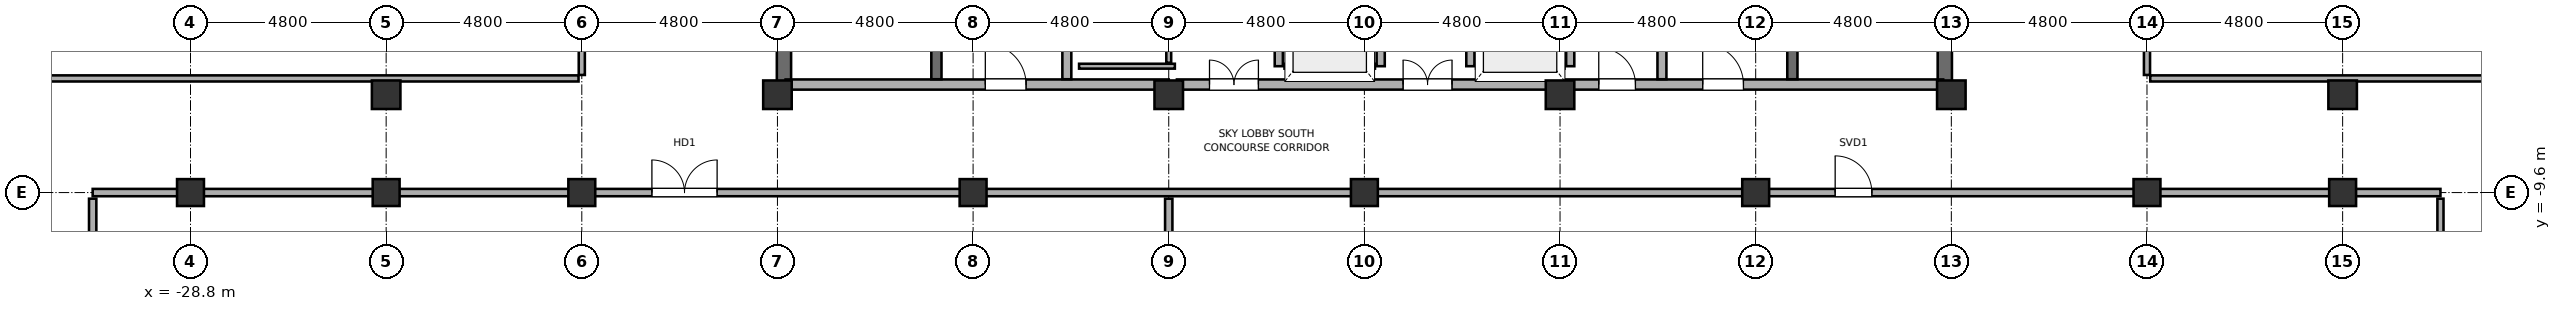
"""IFC4 building model, lengths in metres.
Left out: names, types, materials, properties, quantities, classifications, styles, units other than length and angle.
Written with IfcOpenShell. Run it as: python <this file> out.ifc"""

import sys

from ifc_helpers import new_model, si_unit, direction, frame, frame_2d, origin, origin_2d, place, context, subcontext, project, spatial, rectangle, hollow_rectangle, hollow_circle, extrude, element, fill, save


model = new_model("IFC4")
c1 = context("Model", 3, precision=1e-05, world=origin(), true_north=direction((0.0, 1.0)))
c2 = subcontext(c1, "Body", "Model", "MODEL_VIEW")
j1 = project(units=[si_unit("LENGTHUNIT", "METRE"), si_unit("PLANEANGLEUNIT", "RADIAN")], contexts=[c1])
p1 = place(None, origin())
s1 = spatial("IfcSite", under=j1, at=p1, CompositionType="ELEMENT")
p2 = place(p1, origin())
s2 = spatial("IfcBuilding", under=s1, at=p2, CompositionType="ELEMENT")
p3 = place(p2, frame((0.0, 0.0, 180.3)))
s3 = spatial("IfcBuildingStorey", under=s2, at=p3, CompositionType="ELEMENT", Elevation=180.3)
for number, where, z_axis, x_axis in (
    (1, (-28.8, -9.6, 0.0), (0.0, 0.0, 1.0), (1.0, 0.0, 0.0)),
    (2, (-24.0, -9.6, 0.0), (0.0, 0.0, 1.0), (1.0, 0.0, 0.0)),
):
    element("IfcColumn", number, at=place(p3, frame(where, z_axis=z_axis, x_axis=x_axis)), inside=s3, PredefinedType="COLUMN", context=c2, shape_type="SweptSolid", body=[
        extrude(hollow_circle(Radius=0.33, WallThickness=0.028, at=origin_2d()), origin(), (0.0, 0.0, 1.0), 5.2),
    ])
p4 = place(p3, frame((-24.0, -7.2, 0.0), z_axis=(0.0, 0.0, 1.0), x_axis=(1.0, 0.0, 0.0)))
e3 = element("IfcColumn", 3, at=p4, inside=s3, PredefinedType="COLUMN", context=c2, shape_type="SweptSolid", body=[
    extrude(hollow_rectangle(XDim=0.7, YDim=0.7, WallThickness=0.032, at=origin_2d()), origin(), (0.0, 0.0, 1.0), 5.2),
])
p5 = place(p3, frame((-19.2, -9.6, 0.0), z_axis=(0.0, 0.0, 1.0), x_axis=(1.0, 0.0, 0.0)))
e4 = element("IfcColumn", 4, at=p5, inside=s3, PredefinedType="COLUMN", context=c2, shape_type="SweptSolid", body=[
    extrude(hollow_circle(Radius=0.33, WallThickness=0.028, at=origin_2d()), origin(), (0.0, 0.0, 1.0), 5.2),
])
p6 = place(p3, frame((-14.4, -7.2, 0.0), z_axis=(0.0, 0.0, 1.0), x_axis=(1.0, 0.0, 0.0)))
e5 = element("IfcColumn", 5, at=p6, inside=s3, PredefinedType="COLUMN", context=c2, shape_type="SweptSolid", body=[
    extrude(hollow_rectangle(XDim=0.7, YDim=0.7, WallThickness=0.032, at=origin_2d()), origin(), (0.0, 0.0, 1.0), 5.2),
])
p7 = place(p3, frame((-9.6, -9.6, 0.0), z_axis=(0.0, 0.0, 1.0), x_axis=(1.0, 0.0, 0.0)))
e6 = element("IfcColumn", 6, at=p7, inside=s3, PredefinedType="COLUMN", context=c2, shape_type="SweptSolid", body=[
    extrude(hollow_circle(Radius=0.33, WallThickness=0.028, at=origin_2d()), origin(), (0.0, 0.0, 1.0), 5.2),
])
p8 = place(p3, frame((-4.8, -7.2, 0.0), z_axis=(0.0, 0.0, 1.0), x_axis=(1.0, 0.0, 0.0)))
e7 = element("IfcColumn", 7, at=p8, inside=s3, PredefinedType="COLUMN", context=c2, shape_type="SweptSolid", body=[
    extrude(hollow_rectangle(XDim=0.7, YDim=0.7, WallThickness=0.032, at=origin_2d()), origin(), (0.0, 0.0, 1.0), 5.2),
])
p9 = place(p3, frame((0.0, -9.6, 0.0), z_axis=(0.0, 0.0, 1.0), x_axis=(1.0, 0.0, 0.0)))
e8 = element("IfcColumn", 8, at=p9, inside=s3, PredefinedType="COLUMN", context=c2, shape_type="SweptSolid", body=[
    extrude(hollow_circle(Radius=0.33, WallThickness=0.028, at=origin_2d()), origin(), (0.0, 0.0, 1.0), 5.2),
])
p10 = place(p3, frame((4.8, -7.2, 0.0), z_axis=(0.0, 0.0, 1.0), x_axis=(1.0, 0.0, 0.0)))
e9 = element("IfcColumn", 9, at=p10, inside=s3, PredefinedType="COLUMN", context=c2, shape_type="SweptSolid", body=[
    extrude(hollow_rectangle(XDim=0.7, YDim=0.7, WallThickness=0.032, at=origin_2d()), origin(), (0.0, 0.0, 1.0), 5.2),
])
p11 = place(p3, frame((9.6, -9.6, 0.0), z_axis=(0.0, 0.0, 1.0), x_axis=(1.0, 0.0, 0.0)))
e10 = element("IfcColumn", 10, at=p11, inside=s3, PredefinedType="COLUMN", context=c2, shape_type="SweptSolid", body=[
    extrude(hollow_circle(Radius=0.33, WallThickness=0.028, at=origin_2d()), origin(), (0.0, 0.0, 1.0), 5.2),
])
p12 = place(p3, frame((14.4, -7.2, 0.0), z_axis=(0.0, 0.0, 1.0), x_axis=(1.0, 0.0, 0.0)))
e11 = element("IfcColumn", 11, at=p12, inside=s3, PredefinedType="COLUMN", context=c2, shape_type="SweptSolid", body=[
    extrude(hollow_rectangle(XDim=0.7, YDim=0.7, WallThickness=0.032, at=origin_2d()), origin(), (0.0, 0.0, 1.0), 5.2),
])
for number, where, z_axis, x_axis in (
    (12, (19.2, -9.6, 0.0), (0.0, 0.0, 1.0), (1.0, 0.0, 0.0)),
    (13, (24.0, -9.6, 0.0), (0.0, 0.0, 1.0), (1.0, 0.0, 0.0)),
):
    element("IfcColumn", number, at=place(p3, frame(where, z_axis=z_axis, x_axis=x_axis)), inside=s3, PredefinedType="COLUMN", context=c2, shape_type="SweptSolid", body=[
        extrude(hollow_circle(Radius=0.33, WallThickness=0.028, at=origin_2d()), origin(), (0.0, 0.0, 1.0), 5.2),
    ])
p13 = place(p3, frame((24.0, -7.2, 0.0), z_axis=(0.0, 0.0, 1.0), x_axis=(1.0, 0.0, 0.0)))
e14 = element("IfcColumn", 14, at=p13, inside=s3, PredefinedType="COLUMN", context=c2, shape_type="SweptSolid", body=[
    extrude(hollow_rectangle(XDim=0.7, YDim=0.7, WallThickness=0.032, at=origin_2d()), origin(), (0.0, 0.0, 1.0), 5.2),
])
for number, where, z_axis, x_axis in (
    (15, (-14.24, -7.2, -0.22), (0.0, 0.0, 1.0), (0.0, 1.0, 0.0)),
    (16, (14.24, -7.2, -0.22), (0.0, 0.0, 1.0), (0.0, 1.0, 0.0)),
):
    element("IfcWall", number, at=place(p3, frame(where, z_axis=z_axis, x_axis=x_axis)), inside=s3, PredefinedType="SHEAR", context=c2, shape_type="SweptSolid", body=[
        extrude(rectangle(XDim=14.4, YDim=0.35, at=frame_2d((7.2, 0.0))), origin(), (0.0, 0.0, 1.0), 5.17),
    ])
p14 = place(p3, frame((-14.2, -6.95, 0.0), z_axis=(0.0, 0.0, 1.0), x_axis=(1.0, 0.0, 0.0)))
e17 = element("IfcWall", 17, at=p14, inside=s3, PredefinedType="SOLIDWALL", context=c2, shape_type="SweptSolid", body=[
    extrude(rectangle(XDim=9.4, YDim=0.25, at=frame_2d((4.7, 0.0))), origin(), (0.0, 0.0, 1.0), 3.55),
])
p15 = place(p14, frame((4.9, 0.0, 0.0)))
e18 = element("IfcOpeningElement", 18, at=p15, cuts=e17, PredefinedType="OPENING", context=c2, shape_type="SweptSolid", body=[
    extrude(rectangle(XDim=1.0, YDim=2.15, at=frame_2d((0.5, 1.075))), frame((0.0, 0.14, 0.0), z_axis=(0.0, -1.0, 0.0), x_axis=(1.0, 0.0, 0.0)), (0.0, 0.0, 1.0), 0.28),
])
p16 = place(p3, frame((-4.6, -6.95, 0.0), z_axis=(0.0, 0.0, 1.0), x_axis=(1.0, 0.0, 0.0)))
e19 = element("IfcWall", 19, at=p16, inside=s3, PredefinedType="SOLIDWALL", context=c2, shape_type="SweptSolid", body=[
    extrude(rectangle(XDim=9.2, YDim=0.25, at=frame_2d((4.6, 0.0))), origin(), (0.0, 0.0, 1.0), 3.75),
])
p17 = place(p16, frame((0.8, 0.0, 0.0)))
e20 = element("IfcOpeningElement", 20, at=p17, cuts=e19, PredefinedType="OPENING", context=c2, shape_type="SweptSolid", body=[
    extrude(rectangle(XDim=1.2, YDim=2.2, at=frame_2d((0.6, 1.1))), frame((0.0, 0.14, 0.0), z_axis=(0.0, -1.0, 0.0), x_axis=(1.0, 0.0, 0.0)), (0.0, 0.0, 1.0), 0.28),
])
p18 = place(p16, frame((5.55, 0.0, 0.0)))
e21 = element("IfcOpeningElement", 21, at=p18, cuts=e19, PredefinedType="OPENING", context=c2, shape_type="SweptSolid", body=[
    extrude(rectangle(XDim=1.2, YDim=2.2, at=frame_2d((0.6, 1.1))), frame((0.0, 0.14, 0.0), z_axis=(0.0, -1.0, 0.0), x_axis=(1.0, 0.0, 0.0)), (0.0, 0.0, 1.0), 0.28),
])
p19 = place(p3, frame((4.8, -6.95, 0.0), z_axis=(0.0, 0.0, 1.0), x_axis=(1.0, 0.0, 0.0)))
e22 = element("IfcWall", 22, at=p19, inside=s3, PredefinedType="SOLIDWALL", context=c2, shape_type="SweptSolid", body=[
    extrude(rectangle(XDim=9.4, YDim=0.25, at=frame_2d((4.7, 0.0))), origin(), (0.0, 0.0, 1.0), 3.55),
])
p20 = place(p19, frame((3.5, 0.0, 0.0)))
e23 = element("IfcOpeningElement", 23, at=p20, cuts=e22, PredefinedType="OPENING", context=c2, shape_type="SweptSolid", body=[
    extrude(rectangle(XDim=1.0, YDim=2.15, at=frame_2d((0.5, 1.075))), frame((0.0, 0.14, 0.0), z_axis=(0.0, -1.0, 0.0), x_axis=(1.0, 0.0, 0.0)), (0.0, 0.0, 1.0), 0.28),
])
p21 = place(p19, frame((0.95, 0.0, 0.0)))
e24 = element("IfcOpeningElement", 24, at=p21, cuts=e22, PredefinedType="OPENING", context=c2, shape_type="SweptSolid", body=[
    extrude(rectangle(XDim=0.9, YDim=2.1, at=frame_2d((0.45, 1.05))), frame((0.0, 0.14, 0.0), z_axis=(0.0, -1.0, 0.0), x_axis=(1.0, 0.0, 0.0)), (0.0, 0.0, 1.0), 0.28),
])
for number, where, z_axis, x_axis in (
    (25, (-7.3, -6.82, 0.0), (0.0, 0.0, 1.0), (0.0, 1.0, 0.0)),
    (26, (7.3, -6.82, 0.0), (0.0, 0.0, 1.0), (0.0, 1.0, 0.0)),
):
    element("IfcWall", number, at=place(p3, frame(where, z_axis=z_axis, x_axis=x_axis)), inside=s3, PredefinedType="SOLIDWALL", context=c2, shape_type="SweptSolid", body=[
        extrude(rectangle(XDim=3.67, YDim=0.22, at=frame_2d((1.835, 0.0))), origin(), (0.0, 0.0, 1.0), 3.55),
    ])
p22 = place(p3, frame((-10.5, -6.82, -0.22), z_axis=(0.0, 0.0, 1.0), x_axis=(0.0, 1.0, 0.0)))
e27 = element("IfcWall", 27, at=p22, inside=s3, PredefinedType="SOLIDWALL", context=c2, shape_type="SweptSolid", body=[
    extrude(rectangle(XDim=13.64, YDim=0.25, at=frame_2d((6.82, 0.0))), origin(), (0.0, 0.0, 1.0), 5.17),
])
p23 = place(p22, frame((2.32, 0.0, 0.22)))
e28 = element("IfcOpeningElement", 28, at=p23, cuts=e27, PredefinedType="OPENING", context=c2, shape_type="SweptSolid", body=[
    extrude(rectangle(XDim=0.95, YDim=2.15, at=frame_2d((0.475, 1.075))), frame((0.0, 0.14, 0.0), z_axis=(0.0, -1.0, 0.0), x_axis=(1.0, 0.0, 0.0)), (0.0, 0.0, 1.0), 0.28),
])
p24 = place(p3, frame((10.5, -6.82, -0.22), z_axis=(0.0, 0.0, 1.0), x_axis=(0.0, 1.0, 0.0)))
e29 = element("IfcWall", 29, at=p24, inside=s3, PredefinedType="SOLIDWALL", context=c2, shape_type="SweptSolid", body=[
    extrude(rectangle(XDim=13.64, YDim=0.25, at=frame_2d((6.82, 0.0))), origin(), (0.0, 0.0, 1.0), 5.17),
])
p25 = place(p24, frame((2.32, 0.0, 0.22)))
e30 = element("IfcOpeningElement", 30, at=p25, cuts=e29, PredefinedType="OPENING", context=c2, shape_type="SweptSolid", body=[
    extrude(rectangle(XDim=0.95, YDim=2.15, at=frame_2d((0.475, 1.075))), frame((0.0, 0.14, 0.0), z_axis=(0.0, -1.0, 0.0), x_axis=(1.0, 0.0, 0.0)), (0.0, 0.0, 1.0), 0.28),
])
p26 = place(p3, frame((-2.1, -6.5, 0.0), z_axis=(0.0, 0.0, 1.0), x_axis=(0.0, 1.0, 0.0)))
e31 = element("IfcWall", 31, at=p26, inside=s3, PredefinedType="SOLIDWALL", context=c2, shape_type="SweptSolid", body=[
    extrude(rectangle(XDim=8.85, YDim=0.2, at=frame_2d((4.425, 0.0))), origin(), (0.0, 0.0, 1.0), 4.95),
])
p27 = place(p26, frame((0.5, 0.0, 0.0)))
e32 = element("IfcOpeningElement", 32, at=p27, cuts=e31, PredefinedType="OPENING", context=c2, shape_type="SweptSolid", body=[
    extrude(rectangle(XDim=1.1, YDim=2.2, at=frame_2d((0.55, 1.1))), frame((0.0, 0.115, 0.0), z_axis=(0.0, -1.0, 0.0), x_axis=(1.0, 0.0, 0.0)), (0.0, 0.0, 1.0), 0.23),
])
p28 = place(p26, frame((2.75, 0.0, 0.0)))
e33 = element("IfcOpeningElement", 33, at=p28, cuts=e31, PredefinedType="OPENING", context=c2, shape_type="SweptSolid", body=[
    extrude(rectangle(XDim=1.1, YDim=2.2, at=frame_2d((0.55, 1.1))), frame((0.0, 0.115, 0.0), z_axis=(0.0, -1.0, 0.0), x_axis=(1.0, 0.0, 0.0)), (0.0, 0.0, 1.0), 0.23),
])
p29 = place(p26, frame((5.0, 0.0, 0.0)))
e34 = element("IfcOpeningElement", 34, at=p29, cuts=e31, PredefinedType="OPENING", context=c2, shape_type="SweptSolid", body=[
    extrude(rectangle(XDim=1.1, YDim=2.2, at=frame_2d((0.55, 1.1))), frame((0.0, 0.115, 0.0), z_axis=(0.0, -1.0, 0.0), x_axis=(1.0, 0.0, 0.0)), (0.0, 0.0, 1.0), 0.23),
])
p30 = place(p26, frame((7.25, 0.0, 0.0)))
e35 = element("IfcOpeningElement", 35, at=p30, cuts=e31, PredefinedType="OPENING", context=c2, shape_type="SweptSolid", body=[
    extrude(rectangle(XDim=1.1, YDim=2.2, at=frame_2d((0.55, 1.1))), frame((0.0, 0.115, 0.0), z_axis=(0.0, -1.0, 0.0), x_axis=(1.0, 0.0, 0.0)), (0.0, 0.0, 1.0), 0.23),
])
p31 = place(p3, frame((0.4, -6.5, 0.0), z_axis=(0.0, 0.0, 1.0), x_axis=(0.0, 1.0, 0.0)))
e36 = element("IfcWall", 36, at=p31, inside=s3, PredefinedType="SOLIDWALL", context=c2, shape_type="SweptSolid", body=[
    extrude(rectangle(XDim=8.85, YDim=0.2, at=frame_2d((4.425, 0.0))), origin(), (0.0, 0.0, 1.0), 4.95),
])
p32 = place(p3, frame((-1.96, -6.5, 0.0), z_axis=(0.0, 0.0, 1.0), x_axis=(1.0, 0.0, 0.0)))
e37 = element("IfcWall", 37, at=p32, inside=s3, PredefinedType="PARTITIONING", context=c2, shape_type="SweptSolid", body=[
    extrude(rectangle(XDim=2.22, YDim=0.12, at=frame_2d((1.11, 0.0))), origin(), (0.0, 0.0, 1.0), 4.95),
])
p33 = place(p3, frame((2.6, -6.5, 0.0), z_axis=(0.0, 0.0, 1.0), x_axis=(0.0, 1.0, 0.0)))
e38 = element("IfcWall", 38, at=p33, inside=s3, PredefinedType="SOLIDWALL", context=c2, shape_type="SweptSolid", body=[
    extrude(rectangle(XDim=6.6, YDim=0.2, at=frame_2d((3.3, 0.0))), origin(), (0.0, 0.0, 1.0), 4.95),
])
p34 = place(p33, frame((0.5, 0.0, 0.0)))
e39 = element("IfcOpeningElement", 39, at=p34, cuts=e38, PredefinedType="OPENING", context=c2, shape_type="SweptSolid", body=[
    extrude(rectangle(XDim=1.1, YDim=2.2, at=frame_2d((0.55, 1.1))), frame((0.0, 0.115, 0.0), z_axis=(0.0, -1.0, 0.0), x_axis=(1.0, 0.0, 0.0)), (0.0, 0.0, 1.0), 0.23),
])
p35 = place(p33, frame((2.75, 0.0, 0.0)))
e40 = element("IfcOpeningElement", 40, at=p35, cuts=e38, PredefinedType="OPENING", context=c2, shape_type="SweptSolid", body=[
    extrude(rectangle(XDim=1.1, YDim=2.2, at=frame_2d((0.55, 1.1))), frame((0.0, 0.115, 0.0), z_axis=(0.0, -1.0, 0.0), x_axis=(1.0, 0.0, 0.0)), (0.0, 0.0, 1.0), 0.23),
])
p36 = place(p33, frame((5.0, 0.0, 0.0)))
e41 = element("IfcOpeningElement", 41, at=p36, cuts=e38, PredefinedType="OPENING", context=c2, shape_type="SweptSolid", body=[
    extrude(rectangle(XDim=1.1, YDim=2.2, at=frame_2d((0.55, 1.1))), frame((0.0, 0.115, 0.0), z_axis=(0.0, -1.0, 0.0), x_axis=(1.0, 0.0, 0.0)), (0.0, 0.0, 1.0), 0.23),
])
p37 = place(p3, frame((5.05, -6.5, 0.0), z_axis=(0.0, 0.0, 1.0), x_axis=(0.0, 1.0, 0.0)))
e42 = element("IfcWall", 42, at=p37, inside=s3, PredefinedType="SOLIDWALL", context=c2, shape_type="SweptSolid", body=[
    extrude(rectangle(XDim=6.6, YDim=0.2, at=frame_2d((3.3, 0.0))), origin(), (0.0, 0.0, 1.0), 4.95),
])
p38 = place(p3, frame((2.74, -6.5, 0.0), z_axis=(0.0, 0.0, 1.0), x_axis=(1.0, 0.0, 0.0)))
e43 = element("IfcWall", 43, at=p38, inside=s3, PredefinedType="PARTITIONING", context=c2, shape_type="SweptSolid", body=[
    extrude(rectangle(XDim=2.17, YDim=0.12, at=frame_2d((1.085, 0.0))), origin(), (0.0, 0.0, 1.0), 4.95),
])
p39 = place(p3, frame((-31.2, -9.6, 0.0), z_axis=(0.0, 0.0, 1.0), x_axis=(1.0, 0.0, 0.0)))
e44 = element("IfcWall", 44, at=p39, inside=s3, PredefinedType="PARTITIONING", context=c2, shape_type="SweptSolid", body=[
    extrude(rectangle(XDim=57.6, YDim=0.18, at=frame_2d((28.8, 0.0))), origin(), (0.0, 0.0, 1.0), 3.55),
])
p40 = place(p39, frame((13.72, 0.0, 0.0)))
e45 = element("IfcOpeningElement", 45, at=p40, cuts=e44, PredefinedType="OPENING", context=c2, shape_type="SweptSolid", body=[
    extrude(rectangle(XDim=1.6, YDim=2.3, at=frame_2d((0.8, 1.15))), frame((0.0, 0.105, 0.0), z_axis=(0.0, -1.0, 0.0), x_axis=(1.0, 0.0, 0.0)), (0.0, 0.0, 1.0), 0.21),
])
p41 = place(p39, frame((42.75, 0.0, 0.0)))
e46 = element("IfcOpeningElement", 46, at=p41, cuts=e44, PredefinedType="OPENING", context=c2, shape_type="SweptSolid", body=[
    extrude(rectangle(XDim=0.9, YDim=2.1, at=frame_2d((0.45, 1.05))), frame((0.0, 0.105, 0.0), z_axis=(0.0, -1.0, 0.0), x_axis=(1.0, 0.0, 0.0)), (0.0, 0.0, 1.0), 0.21),
])
p42 = place(p3, frame((-33.31, -6.8, 0.0), z_axis=(0.0, 0.0, 1.0), x_axis=(1.0, 0.0, 0.0)))
e47 = element("IfcWall", 47, at=p42, inside=s3, PredefinedType="PARTITIONING", context=c2, shape_type="SweptSolid", body=[
    extrude(rectangle(XDim=14.03, YDim=0.15, at=frame_2d((7.015, 0.0))), origin(), (0.0, 0.0, 1.0), 3.55),
])
p43 = place(p3, frame((19.28, -6.8, 0.0), z_axis=(0.0, 0.0, 1.0), x_axis=(1.0, 0.0, 0.0)))
e48 = element("IfcWall", 48, at=p43, inside=s3, PredefinedType="PARTITIONING", context=c2, shape_type="SweptSolid", body=[
    extrude(rectangle(XDim=9.23, YDim=0.15, at=frame_2d((4.615, 0.0))), origin(), (0.0, 0.0, 1.0), 3.55),
])
p44 = place(p3, frame((-7.0, -6.5, 0.0), z_axis=(0.0, 0.0, 1.0), x_axis=(1.0, 0.0, 0.0)))
e49 = element("IfcWall", 49, at=p44, inside=s3, PredefinedType="PARTITIONING", context=c2, shape_type="SweptSolid", body=[
    extrude(rectangle(XDim=2.35, YDim=0.12, at=frame_2d((1.175, 0.0))), origin(), (0.0, 0.0, 1.0), 4.95),
])
p45 = place(p3, frame((-31.2, -23.239, 0.0), z_axis=(0.0, 0.0, 1.0), x_axis=(0.0, 1.0, 0.0)))
e50 = element("IfcWall", 50, at=p45, inside=s3, PredefinedType="PARTITIONING", context=c2, shape_type="SweptSolid", body=[
    extrude(rectangle(XDim=13.489, YDim=0.18, at=frame_2d((6.744, 0.0))), origin(), (0.0, 0.0, 1.0), 3.55),
])
p46 = place(p3, frame((-19.2, -6.715, 0.0), z_axis=(0.0, 0.0, 1.0), x_axis=(0.0, 1.0, 0.0)))
e51 = element("IfcWall", 51, at=p46, inside=s3, PredefinedType="PARTITIONING", context=c2, shape_type="SweptSolid", body=[
    extrude(rectangle(XDim=13.43, YDim=0.15, at=frame_2d((6.715, 0.0))), origin(), (0.0, 0.0, 1.0), 3.55),
])
p47 = place(p46, frame((8.413, 0.0, 0.0)))
e52 = element("IfcOpeningElement", 52, at=p47, cuts=e51, PredefinedType="OPENING", context=c2, shape_type="SweptSolid", body=[
    extrude(rectangle(XDim=0.9, YDim=2.1, at=frame_2d((0.45, 1.05))), frame((0.0, 0.09, 0.0), z_axis=(0.0, -1.0, 0.0), x_axis=(1.0, 0.0, 0.0)), (0.0, 0.0, 1.0), 0.18),
])
p48 = place(p3, frame((-4.8, -23.71, 0.0), z_axis=(0.0, 0.0, 1.0), x_axis=(0.0, 1.0, 0.0)))
e53 = element("IfcWall", 53, at=p48, inside=s3, PredefinedType="PARTITIONING", context=c2, shape_type="SweptSolid", body=[
    extrude(rectangle(XDim=13.96, YDim=0.18, at=frame_2d((6.98, 0.0))), origin(), (0.0, 0.0, 1.0), 3.55),
])
p49 = place(p3, frame((-4.8, -6.415, 0.0), z_axis=(0.0, 0.0, 1.0), x_axis=(0.0, 1.0, 0.0)))
e54 = element("IfcWall", 54, at=p49, inside=s3, PredefinedType="PARTITIONING", context=c2, shape_type="SweptSolid", body=[
    extrude(rectangle(XDim=8.53, YDim=0.12, at=frame_2d((4.265, 0.0))), origin(), (0.0, 0.0, 1.0), 4.95),
])
p50 = place(p49, frame((1.465, 0.0, 0.0)))
e55 = element("IfcOpeningElement", 55, at=p50, cuts=e54, PredefinedType="OPENING", context=c2, shape_type="SweptSolid", body=[
    extrude(rectangle(XDim=0.9, YDim=2.1, at=frame_2d((0.45, 1.05))), frame((0.0, 0.075, 0.0), z_axis=(0.0, -1.0, 0.0), x_axis=(1.0, 0.0, 0.0)), (0.0, 0.0, 1.0), 0.15),
])
p51 = place(p49, frame((5.965, 0.0, 0.0)))
e56 = element("IfcOpeningElement", 56, at=p51, cuts=e54, PredefinedType="OPENING", context=c2, shape_type="SweptSolid", body=[
    extrude(rectangle(XDim=0.9, YDim=2.1, at=frame_2d((0.45, 1.05))), frame((0.0, 0.075, 0.0), z_axis=(0.0, -1.0, 0.0), x_axis=(1.0, 0.0, 0.0)), (0.0, 0.0, 1.0), 0.15),
])
p52 = place(p3, frame((19.2, -6.715, 0.0), z_axis=(0.0, 0.0, 1.0), x_axis=(0.0, 1.0, 0.0)))
e57 = element("IfcWall", 57, at=p52, inside=s3, PredefinedType="PARTITIONING", context=c2, shape_type="SweptSolid", body=[
    extrude(rectangle(XDim=13.43, YDim=0.15, at=frame_2d((6.715, 0.0))), origin(), (0.0, 0.0, 1.0), 3.55),
])
p53 = place(p52, frame((8.413, 0.0, 0.0)))
e58 = element("IfcOpeningElement", 58, at=p53, cuts=e57, PredefinedType="OPENING", context=c2, shape_type="SweptSolid", body=[
    extrude(rectangle(XDim=0.9, YDim=2.1, at=frame_2d((0.45, 1.05))), frame((0.0, 0.09, 0.0), z_axis=(0.0, -1.0, 0.0), x_axis=(1.0, 0.0, 0.0)), (0.0, 0.0, 1.0), 0.18),
])
p54 = place(p3, frame((26.4, -23.239, 0.0), z_axis=(0.0, 0.0, 1.0), x_axis=(0.0, 1.0, 0.0)))
e59 = element("IfcWall", 59, at=p54, inside=s3, PredefinedType="PARTITIONING", context=c2, shape_type="SweptSolid", body=[
    extrude(rectangle(XDim=13.489, YDim=0.15, at=frame_2d((6.744, 0.0))), origin(), (0.0, 0.0, 1.0), 3.55),
])
p55 = place(p15, origin())
e60 = element("IfcDoor", 60, at=p55, inside=s3, OperationType="SINGLE_SWING_LEFT", PredefinedType="DOOR", context=c2, shape_type="SweptSolid", body=[
    extrude(rectangle(XDim=1.0, YDim=2.15, at=frame_2d((0.5, 1.075))), frame((0.0, 0.025, 0.0), z_axis=(0.0, -1.0, 0.0), x_axis=(1.0, 0.0, 0.0)), (0.0, 0.0, 1.0), 0.05),
])
fill(e18, e60)
p56 = place(p20, origin())
e61 = element("IfcDoor", 61, at=p56, inside=s3, OperationType="SINGLE_SWING_LEFT", PredefinedType="DOOR", context=c2, shape_type="SweptSolid", body=[
    extrude(rectangle(XDim=1.0, YDim=2.15, at=frame_2d((0.5, 1.075))), frame((0.0, 0.025, 0.0), z_axis=(0.0, -1.0, 0.0), x_axis=(1.0, 0.0, 0.0)), (0.0, 0.0, 1.0), 0.05),
])
fill(e23, e61)
p57 = place(p17, origin())
e62 = element("IfcDoor", 62, at=p57, inside=s3, OperationType="DOUBLE_DOOR_SINGLE_SWING", PredefinedType="DOOR", context=c2, shape_type="SweptSolid", body=[
    extrude(rectangle(XDim=1.2, YDim=2.2, at=frame_2d((0.6, 1.1))), frame((0.0, 0.025, 0.0), z_axis=(0.0, -1.0, 0.0), x_axis=(1.0, 0.0, 0.0)), (0.0, 0.0, 1.0), 0.05),
])
fill(e20, e62)
p58 = place(p18, origin())
e63 = element("IfcDoor", 63, at=p58, inside=s3, OperationType="DOUBLE_DOOR_SINGLE_SWING", PredefinedType="DOOR", context=c2, shape_type="SweptSolid", body=[
    extrude(rectangle(XDim=1.2, YDim=2.2, at=frame_2d((0.6, 1.1))), frame((0.0, 0.025, 0.0), z_axis=(0.0, -1.0, 0.0), x_axis=(1.0, 0.0, 0.0)), (0.0, 0.0, 1.0), 0.05),
])
fill(e21, e63)
p59 = place(p21, origin())
e64 = element("IfcDoor", 64, at=p59, inside=s3, OperationType="SINGLE_SWING_LEFT", PredefinedType="DOOR", context=c2, shape_type="SweptSolid", body=[
    extrude(rectangle(XDim=0.9, YDim=2.1, at=frame_2d((0.45, 1.05))), frame((0.0, 0.025, 0.0), z_axis=(0.0, -1.0, 0.0), x_axis=(1.0, 0.0, 0.0)), (0.0, 0.0, 1.0), 0.05),
])
fill(e24, e64)
p60 = place(p40, origin())
e65 = element("IfcDoor", 65, at=p60, inside=s3, OperationType="DOUBLE_DOOR_SINGLE_SWING", PredefinedType="DOOR", context=c2, shape_type="SweptSolid", body=[
    extrude(rectangle(XDim=1.6, YDim=2.3, at=frame_2d((0.8, 1.15))), frame((0.0, 0.025, 0.0), z_axis=(0.0, -1.0, 0.0), x_axis=(1.0, 0.0, 0.0)), (0.0, 0.0, 1.0), 0.05),
])
fill(e45, e65)
p61 = place(p41, origin())
e66 = element("IfcDoor", 66, at=p61, inside=s3, OperationType="SINGLE_SWING_LEFT", PredefinedType="DOOR", context=c2, shape_type="SweptSolid", body=[
    extrude(rectangle(XDim=0.9, YDim=2.1, at=frame_2d((0.45, 1.05))), frame((0.0, 0.025, 0.0), z_axis=(0.0, -1.0, 0.0), x_axis=(1.0, 0.0, 0.0)), (0.0, 0.0, 1.0), 0.05),
])
fill(e46, e66)
save(model, sys.argv[1])
